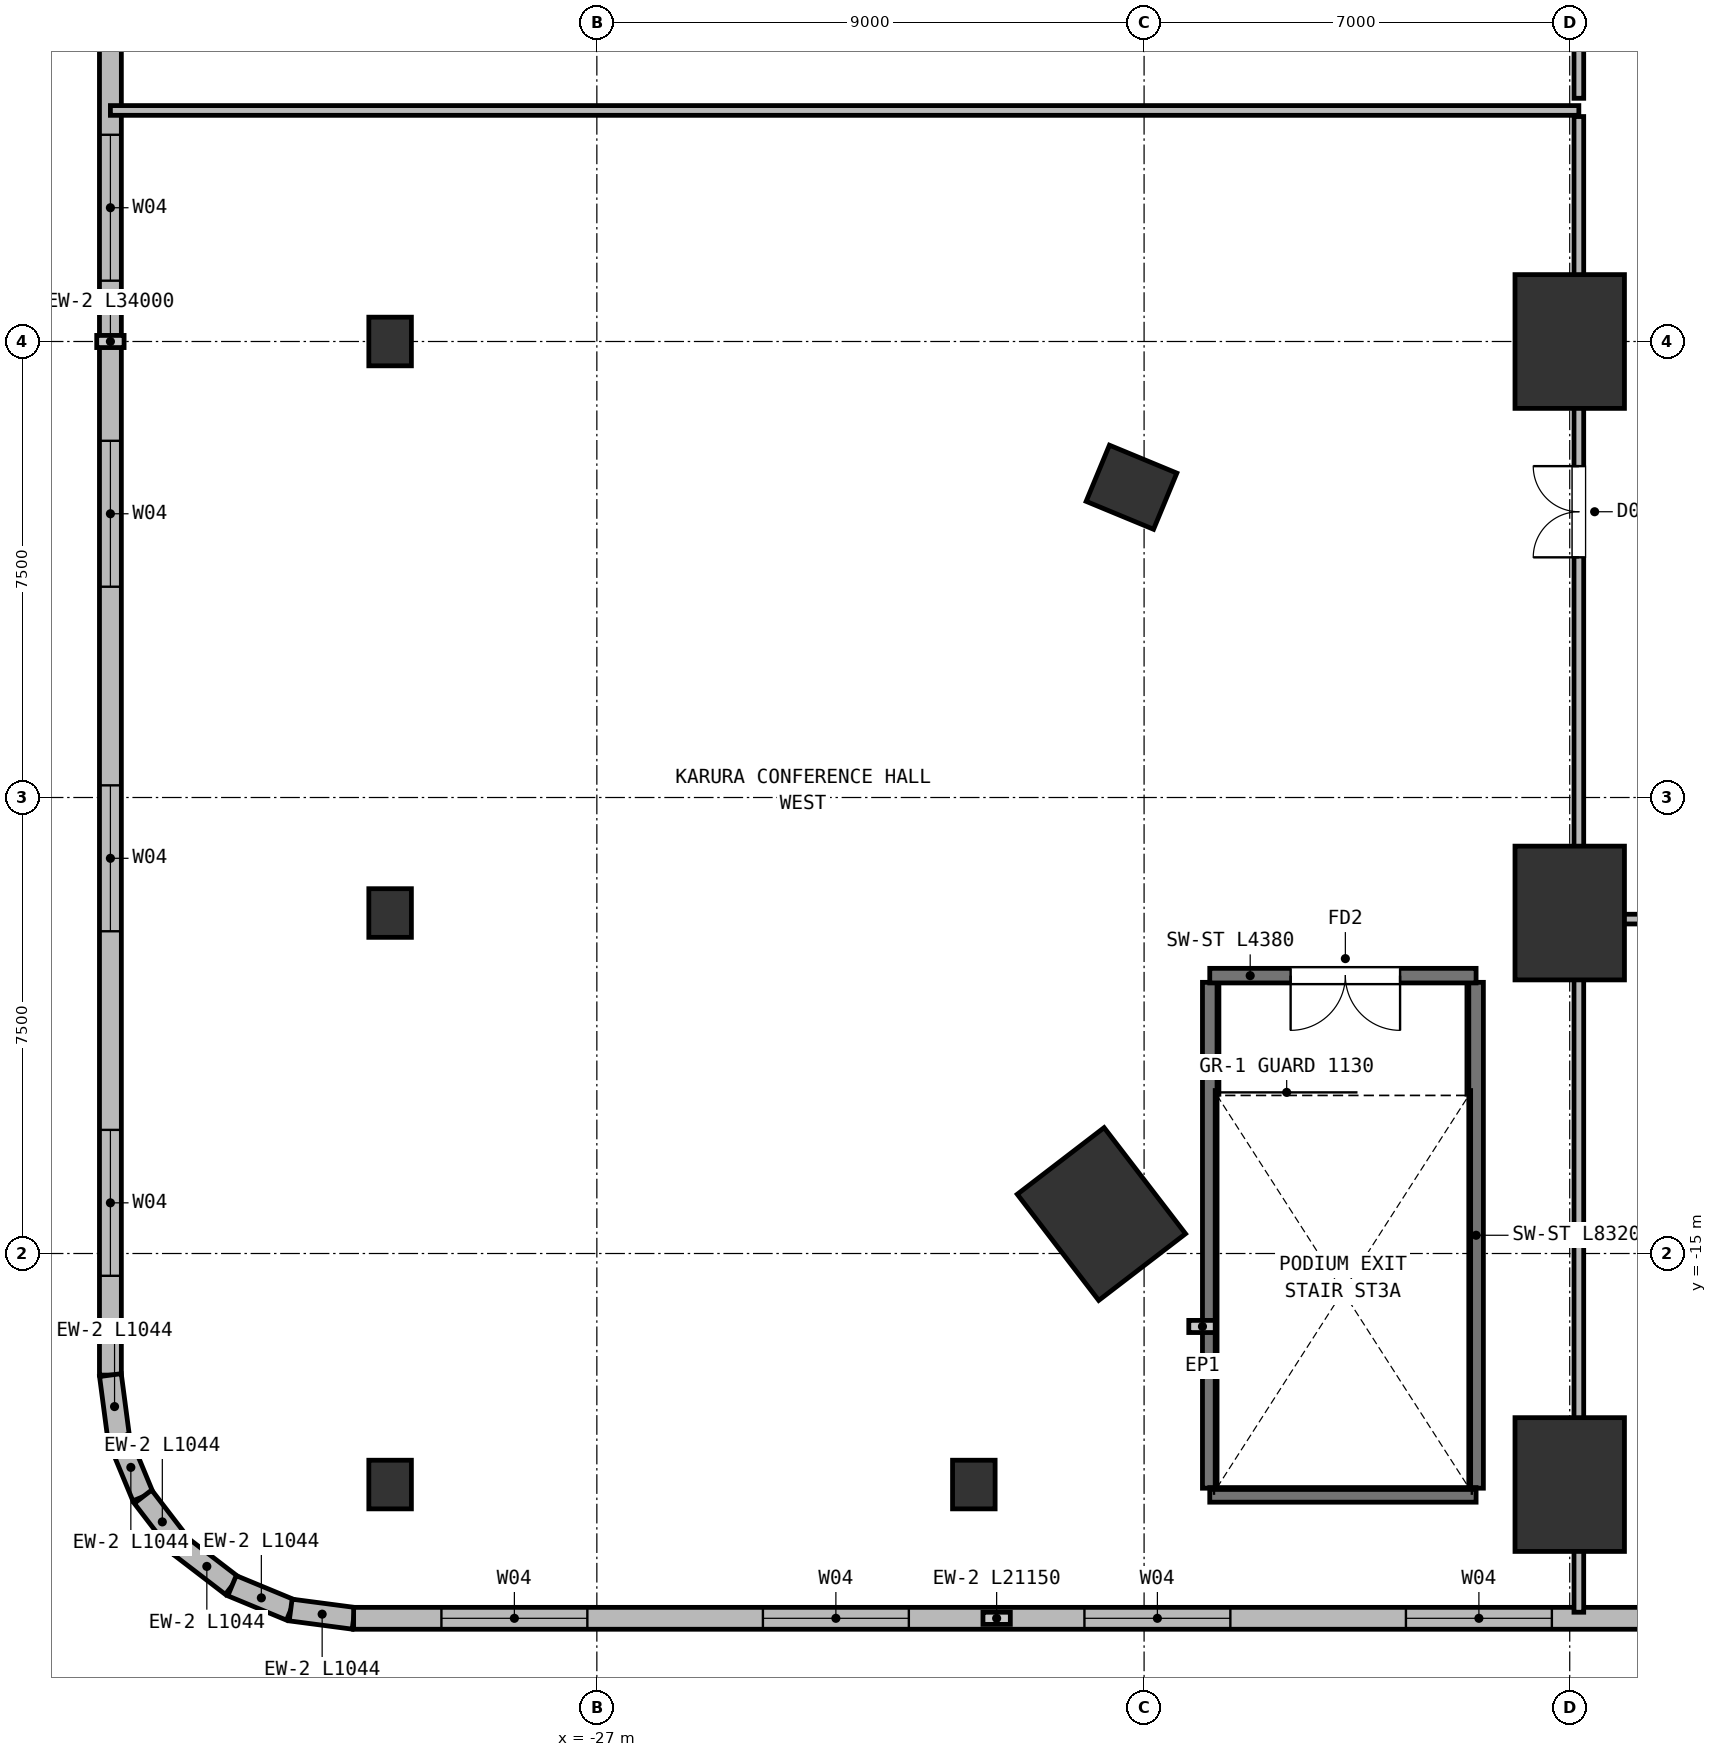
"""IFC4 building model, lengths in metres.
Left out: names, types, materials, properties, quantities, classifications, styles, units other than length and angle.
Written with IfcOpenShell. Run it as: python <this file> out.ifc"""

import sys

from ifc_helpers import new_model, si_unit, direction, frame, frame_2d, origin, origin_2d, place, context, subcontext, project, spatial, rectangle, extrude, element, fill, save


model = new_model("IFC4")
c1 = context("Model", 3, precision=1e-05, world=origin(), true_north=direction((0.0, 1.0)))
c2 = subcontext(c1, "Body", "Model", "MODEL_VIEW")
j1 = project(units=[si_unit("LENGTHUNIT", "METRE"), si_unit("PLANEANGLEUNIT", "RADIAN")], contexts=[c1])
p1 = place(None, origin())
s1 = spatial("IfcSite", under=j1, at=p1, CompositionType="ELEMENT")
p2 = place(p1, origin())
s2 = spatial("IfcBuilding", under=s1, at=p2, CompositionType="ELEMENT")
p3 = place(p2, frame((0.0, 0.0, 26.0)))
s3 = spatial("IfcBuildingStorey", under=s2, at=p3, CompositionType="ELEMENT", Elevation=26.0)
p4 = place(p3, frame((-18.207, -2.397, 0.0), z_axis=(0.0, 0.0, 1.0), x_axis=(0.382683432365, 0.923879532511, 0.0)))
e1 = element("IfcColumn", 1, at=p4, inside=s3, PredefinedType="COLUMN", context=c2, shape_type="SweptSolid", body=[
    extrude(rectangle(XDim=1.0, YDim=1.2, at=origin_2d()), origin(), (0.0, 0.0, 1.0), 4.5),
])
p5 = place(p3, frame((-18.702, -14.351, 0.0), z_axis=(0.0, 0.0, 1.0), x_axis=(0.793353340291, 0.608761429009, 0.0)))
e2 = element("IfcColumn", 2, at=p5, inside=s3, PredefinedType="COLUMN", context=c2, shape_type="SweptSolid", body=[
    extrude(rectangle(XDim=1.8, YDim=2.2, at=origin_2d()), origin(), (0.0, 0.0, 1.0), 4.5),
])
for number, where, z_axis, x_axis in (
    (3, (-30.4, -18.8, 0.0), (0.0, 0.0, 1.0), (1.0, 0.0, 0.0)),
    (4, (-30.4, -9.4, 0.0), (0.0, 0.0, 1.0), (1.0, 0.0, 0.0)),
    (5, (-30.4, 0.0, 0.0), (0.0, 0.0, 1.0), (1.0, 0.0, 0.0)),
    (6, (-20.8, -18.8, 0.0), (0.0, 0.0, 1.0), (1.0, 0.0, 0.0)),
):
    element("IfcColumn", number, at=place(p3, frame(where, z_axis=z_axis, x_axis=x_axis)), inside=s3, PredefinedType="COLUMN", context=c2, shape_type="SweptSolid", body=[
        extrude(rectangle(XDim=0.7, YDim=0.8, at=origin_2d()), origin(), (0.0, 0.0, 1.0), 4.5),
    ])
for number, where, z_axis, x_axis in (
    (7, (-11.0, -18.8, 0.0), (0.0, 0.0, 1.0), (1.0, 0.0, 0.0)),
    (8, (-11.0, -9.4, 0.0), (0.0, 0.0, 1.0), (1.0, 0.0, 0.0)),
    (9, (-11.0, 0.0, 0.0), (0.0, 0.0, 1.0), (1.0, 0.0, 0.0)),
):
    element("IfcColumn", number, at=place(p3, frame(where, z_axis=z_axis, x_axis=x_axis)), inside=s3, PredefinedType="COLUMN", context=c2, shape_type="SweptSolid", body=[
        extrude(rectangle(XDim=1.8, YDim=2.2, at=origin_2d()), origin(), (0.0, 0.0, 1.0), 4.5),
    ])
p6 = place(p3, frame((-35.0, -17.0, 0.0), z_axis=(0.0, 0.0, 1.0), x_axis=(0.0, 1.0, 0.0)))
e10 = element("IfcWall", 10, at=p6, inside=s3, PredefinedType="SOLIDWALL", context=c2, shape_type="SweptSolid", body=[
    extrude(rectangle(XDim=34.0, YDim=0.36, at=frame_2d((17.0, 0.0))), origin(), (0.0, 0.0, 1.0), 4.25),
])
p7 = place(p6, frame((1.633, 0.0, 0.95)))
e11 = element("IfcOpeningElement", 11, at=p7, cuts=e10, PredefinedType="OPENING", context=c2, shape_type="SweptSolid", body=[
    extrude(rectangle(XDim=2.4, YDim=2.6, at=frame_2d((1.2, 1.3))), frame((0.0, 0.19, 0.0), z_axis=(0.0, -1.0, 0.0), x_axis=(1.0, 0.0, 0.0)), (0.0, 0.0, 1.0), 0.38),
])
p8 = place(p6, frame((7.3, 0.0, 0.95)))
e12 = element("IfcOpeningElement", 12, at=p8, cuts=e10, PredefinedType="OPENING", context=c2, shape_type="SweptSolid", body=[
    extrude(rectangle(XDim=2.4, YDim=2.6, at=frame_2d((1.2, 1.3))), frame((0.0, 0.19, 0.0), z_axis=(0.0, -1.0, 0.0), x_axis=(1.0, 0.0, 0.0)), (0.0, 0.0, 1.0), 0.38),
])
p9 = place(p6, frame((12.967, 0.0, 0.95)))
e13 = element("IfcOpeningElement", 13, at=p9, cuts=e10, PredefinedType="OPENING", context=c2, shape_type="SweptSolid", body=[
    extrude(rectangle(XDim=2.4, YDim=2.6, at=frame_2d((1.2, 1.3))), frame((0.0, 0.19, 0.0), z_axis=(0.0, -1.0, 0.0), x_axis=(1.0, 0.0, 0.0)), (0.0, 0.0, 1.0), 0.38),
])
p10 = place(p6, frame((18.0, 0.0, 0.95)))
e14 = element("IfcOpeningElement", 14, at=p10, cuts=e10, PredefinedType="OPENING", context=c2, shape_type="SweptSolid", body=[
    extrude(rectangle(XDim=2.4, YDim=2.6, at=frame_2d((1.2, 1.3))), frame((0.0, 0.19, 0.0), z_axis=(0.0, -1.0, 0.0), x_axis=(1.0, 0.0, 0.0)), (0.0, 0.0, 1.0), 0.38),
])
p11 = place(p6, frame((24.3, 0.0, 0.95)))
e15 = element("IfcOpeningElement", 15, at=p11, cuts=e10, PredefinedType="OPENING", context=c2, shape_type="SweptSolid", body=[
    extrude(rectangle(XDim=2.4, YDim=2.6, at=frame_2d((1.2, 1.3))), frame((0.0, 0.19, 0.0), z_axis=(0.0, -1.0, 0.0), x_axis=(1.0, 0.0, 0.0)), (0.0, 0.0, 1.0), 0.38),
])
p12 = place(p6, frame((29.967, 0.0, 0.95)))
e16 = element("IfcOpeningElement", 16, at=p12, cuts=e10, PredefinedType="OPENING", context=c2, shape_type="SweptSolid", body=[
    extrude(rectangle(XDim=2.4, YDim=2.6, at=frame_2d((1.2, 1.3))), frame((0.0, 0.19, 0.0), z_axis=(0.0, -1.0, 0.0), x_axis=(1.0, 0.0, 0.0)), (0.0, 0.0, 1.0), 0.38),
])
p13 = place(p3, frame((-34.864, -18.035, 0.0), z_axis=(0.0, 0.0, 1.0), x_axis=(-0.130448465198, 0.991455091231, 0.0)))
e17 = element("IfcWall", 17, at=p13, inside=s3, PredefinedType="SOLIDWALL", context=c2, shape_type="SweptSolid", body=[
    extrude(rectangle(XDim=1.044, YDim=0.36, at=frame_2d((0.522, 0.0))), origin(), (0.0, 0.0, 1.0), 4.25),
])
for number, where, z_axis, x_axis in (
    (18, (-34.464, -19.0, 0.0), (0.0, 0.0, 1.0), (-0.383, 0.924, 0.0)),
    (19, (-33.828, -19.828, 0.0), (0.0, 0.0, 1.0), (-0.609, 0.793, 0.0)),
    (20, (-33.0, -20.464, 0.0), (0.0, 0.0, 1.0), (-0.793, 0.609, 0.0)),
    (21, (-32.035, -20.864, 0.0), (0.0, 0.0, 1.0), (-0.924, 0.383, 0.0)),
):
    element("IfcWall", number, at=place(p3, frame(where, z_axis=z_axis, x_axis=x_axis)), inside=s3, PredefinedType="SOLIDWALL", context=c2, shape_type="SweptSolid", body=[
        extrude(rectangle(XDim=1.044, YDim=0.36, at=frame_2d((0.522, 0.0))), origin(), (0.0, 0.0, 1.0), 4.25),
    ])
p14 = place(p3, frame((-31.0, -21.0, 0.0), z_axis=(0.0, 0.0, 1.0), x_axis=(-0.991455091231, 0.130448465198, 0.0)))
e22 = element("IfcWall", 22, at=p14, inside=s3, PredefinedType="SOLIDWALL", context=c2, shape_type="SweptSolid", body=[
    extrude(rectangle(XDim=1.044, YDim=0.36, at=frame_2d((0.522, 0.0))), origin(), (0.0, 0.0, 1.0), 4.25),
])
p15 = place(p3, frame((-9.85, -21.0, 0.0), z_axis=(0.0, 0.0, 1.0), x_axis=(-1.0, 0.0, 0.0)))
e23 = element("IfcWall", 23, at=p15, inside=s3, PredefinedType="SOLIDWALL", context=c2, shape_type="SweptSolid", body=[
    extrude(rectangle(XDim=21.15, YDim=0.36, at=frame_2d((10.575, 0.0))), origin(), (0.0, 0.0, 1.0), 4.25),
])
p16 = place(p15, frame((1.444, 0.0, 0.95)))
e24 = element("IfcOpeningElement", 24, at=p16, cuts=e23, PredefinedType="OPENING", context=c2, shape_type="SweptSolid", body=[
    extrude(rectangle(XDim=2.4, YDim=2.6, at=frame_2d((1.2, 1.3))), frame((0.0, 0.19, 0.0), z_axis=(0.0, -1.0, 0.0), x_axis=(1.0, 0.0, 0.0)), (0.0, 0.0, 1.0), 0.38),
])
p17 = place(p15, frame((6.731, 0.0, 0.95)))
e25 = element("IfcOpeningElement", 25, at=p17, cuts=e23, PredefinedType="OPENING", context=c2, shape_type="SweptSolid", body=[
    extrude(rectangle(XDim=2.4, YDim=2.6, at=frame_2d((1.2, 1.3))), frame((0.0, 0.19, 0.0), z_axis=(0.0, -1.0, 0.0), x_axis=(1.0, 0.0, 0.0)), (0.0, 0.0, 1.0), 0.38),
])
p18 = place(p15, frame((12.019, 0.0, 0.95)))
e26 = element("IfcOpeningElement", 26, at=p18, cuts=e23, PredefinedType="OPENING", context=c2, shape_type="SweptSolid", body=[
    extrude(rectangle(XDim=2.4, YDim=2.6, at=frame_2d((1.2, 1.3))), frame((0.0, 0.19, 0.0), z_axis=(0.0, -1.0, 0.0), x_axis=(1.0, 0.0, 0.0)), (0.0, 0.0, 1.0), 0.38),
])
p19 = place(p15, frame((17.306, 0.0, 0.95)))
e27 = element("IfcOpeningElement", 27, at=p19, cuts=e23, PredefinedType="OPENING", context=c2, shape_type="SweptSolid", body=[
    extrude(rectangle(XDim=2.4, YDim=2.6, at=frame_2d((1.2, 1.3))), frame((0.0, 0.19, 0.0), z_axis=(0.0, -1.0, 0.0), x_axis=(1.0, 0.0, 0.0)), (0.0, 0.0, 1.0), 0.38),
])
for number, where, z_axis, x_axis in (
    (28, (-16.92, -18.86, 0.0), (0.0, 0.0, 1.0), (0.0, 1.0, 0.0)),
    (29, (-12.54, -18.86, 0.0), (0.0, 0.0, 1.0), (0.0, 1.0, 0.0)),
):
    element("IfcWall", number, at=place(p3, frame(where, z_axis=z_axis, x_axis=x_axis)), inside=s3, PredefinedType="SHEAR", context=c2, shape_type="SweptSolid", body=[
        extrude(rectangle(XDim=8.32, YDim=0.24, at=frame_2d((4.16, 0.0))), origin(), (0.0, 0.0, 1.0), 4.25),
    ])
p20 = place(p3, frame((-16.92, -18.97, 0.0), z_axis=(0.0, 0.0, 1.0), x_axis=(1.0, 0.0, 0.0)))
e30 = element("IfcWall", 30, at=p20, inside=s3, PredefinedType="SHEAR", context=c2, shape_type="SweptSolid", body=[
    extrude(rectangle(XDim=4.38, YDim=0.24, at=frame_2d((2.19, 0.0))), origin(), (0.0, 0.0, 1.0), 4.25),
])
p21 = place(p3, frame((-12.54, -10.43, 0.0), z_axis=(0.0, 0.0, 1.0), x_axis=(-1.0, 0.0, 0.0)))
e31 = element("IfcWall", 31, at=p21, inside=s3, PredefinedType="SHEAR", context=c2, shape_type="SweptSolid", body=[
    extrude(rectangle(XDim=4.38, YDim=0.24, at=frame_2d((2.19, 0.0))), origin(), (0.0, 0.0, 1.0), 4.25),
])
p22 = place(p21, frame((1.25, 0.0, 0.0)))
e32 = element("IfcOpeningElement", 32, at=p22, cuts=e31, PredefinedType="OPENING", context=c2, shape_type="SweptSolid", body=[
    extrude(rectangle(XDim=1.8, YDim=2.2, at=frame_2d((0.9, 1.1))), frame((0.0, 0.13, 0.0), z_axis=(0.0, -1.0, 0.0), x_axis=(1.0, 0.0, 0.0)), (0.0, 0.0, 1.0), 0.26),
])
p23 = place(p3, frame((-10.85, 3.8, 0.0), z_axis=(0.0, 0.0, 1.0), x_axis=(-1.0, 0.0, 0.0)))
e33 = element("IfcWall", 33, at=p23, inside=s3, PredefinedType="PARTITIONING", context=c2, shape_type="SweptSolid", body=[
    extrude(rectangle(XDim=24.15, YDim=0.16, at=frame_2d((12.075, 0.0))), origin(), (0.0, 0.0, 1.0), 4.25),
])
p24 = place(p3, frame((-10.85, -20.9, 0.0), z_axis=(0.0, 0.0, 1.0), x_axis=(0.0, 1.0, 0.0)))
e34 = element("IfcWall", 34, at=p24, inside=s3, PredefinedType="PARTITIONING", context=c2, shape_type="SweptSolid", body=[
    extrude(rectangle(XDim=24.6, YDim=0.16, at=frame_2d((12.3, 0.0))), origin(), (0.0, 0.0, 1.0), 3.62),
])
p25 = place(p24, frame((17.35, 0.0, 0.0)))
e35 = element("IfcOpeningElement", 35, at=p25, cuts=e34, PredefinedType="OPENING", context=c2, shape_type="SweptSolid", body=[
    extrude(rectangle(XDim=1.5, YDim=2.2, at=frame_2d((0.75, 1.1))), frame((0.0, 0.09, 0.0), z_axis=(0.0, -1.0, 0.0), x_axis=(1.0, 0.0, 0.0)), (0.0, 0.0, 1.0), 0.18),
])
p26 = place(p3, frame((-10.85, 4.0, 0.0), z_axis=(0.0, 0.0, 1.0), x_axis=(0.0, 1.0, 0.0)))
e36 = element("IfcWall", 36, at=p26, inside=s3, PredefinedType="PARTITIONING", context=c2, shape_type="SweptSolid", body=[
    extrude(rectangle(XDim=16.9, YDim=0.16, at=frame_2d((8.45, 0.0))), origin(), (0.0, 0.0, 1.0), 3.62),
])
p27 = place(p26, frame((2.06, 0.0, 0.0)))
e37 = element("IfcOpeningElement", 37, at=p27, cuts=e36, PredefinedType="OPENING", context=c2, shape_type="SweptSolid", body=[
    extrude(rectangle(XDim=1.5, YDim=2.2, at=frame_2d((0.75, 1.1))), frame((0.0, 0.09, 0.0), z_axis=(0.0, -1.0, 0.0), x_axis=(1.0, 0.0, 0.0)), (0.0, 0.0, 1.0), 0.18),
])
p28 = place(p3, frame((10.75, -9.5, 0.0), z_axis=(0.0, 0.0, 1.0), x_axis=(-1.0, 0.0, 0.0)))
e38 = element("IfcWall", 38, at=p28, inside=s3, PredefinedType="PARTITIONING", context=c2, shape_type="SweptSolid", body=[
    extrude(rectangle(XDim=21.5, YDim=0.16, at=frame_2d((10.75, 0.0))), origin(), (0.0, 0.0, 1.0), 3.33),
])
p29 = place(p28, frame((13.8, 0.0, 0.0)))
e39 = element("IfcOpeningElement", 39, at=p29, cuts=e38, PredefinedType="OPENING", context=c2, shape_type="SweptSolid", body=[
    extrude(rectangle(XDim=1.5, YDim=2.2, at=frame_2d((0.75, 1.1))), frame((0.0, 0.09, 0.0), z_axis=(0.0, -1.0, 0.0), x_axis=(1.0, 0.0, 0.0)), (0.0, 0.0, 1.0), 0.18),
])
p30 = place(p7, origin())
e40 = element("IfcWindow", 40, at=p30, inside=s3, PartitioningType="SINGLE_PANEL", PredefinedType="WINDOW", context=c2, shape_type="SweptSolid", body=[
    extrude(rectangle(XDim=2.4, YDim=2.6, at=frame_2d((1.2, 1.3))), frame((0.0, 0.03, 0.0), z_axis=(0.0, -1.0, 0.0), x_axis=(1.0, 0.0, 0.0)), (0.0, 0.0, 1.0), 0.06),
])
fill(e11, e40)
p31 = place(p8, origin())
e41 = element("IfcWindow", 41, at=p31, inside=s3, PartitioningType="SINGLE_PANEL", PredefinedType="WINDOW", context=c2, shape_type="SweptSolid", body=[
    extrude(rectangle(XDim=2.4, YDim=2.6, at=frame_2d((1.2, 1.3))), frame((0.0, 0.03, 0.0), z_axis=(0.0, -1.0, 0.0), x_axis=(1.0, 0.0, 0.0)), (0.0, 0.0, 1.0), 0.06),
])
fill(e12, e41)
p32 = place(p9, origin())
e42 = element("IfcWindow", 42, at=p32, inside=s3, PartitioningType="SINGLE_PANEL", PredefinedType="WINDOW", context=c2, shape_type="SweptSolid", body=[
    extrude(rectangle(XDim=2.4, YDim=2.6, at=frame_2d((1.2, 1.3))), frame((0.0, 0.03, 0.0), z_axis=(0.0, -1.0, 0.0), x_axis=(1.0, 0.0, 0.0)), (0.0, 0.0, 1.0), 0.06),
])
fill(e13, e42)
p33 = place(p10, origin())
e43 = element("IfcWindow", 43, at=p33, inside=s3, PartitioningType="SINGLE_PANEL", PredefinedType="WINDOW", context=c2, shape_type="SweptSolid", body=[
    extrude(rectangle(XDim=2.4, YDim=2.6, at=frame_2d((1.2, 1.3))), frame((0.0, 0.03, 0.0), z_axis=(0.0, -1.0, 0.0), x_axis=(1.0, 0.0, 0.0)), (0.0, 0.0, 1.0), 0.06),
])
fill(e14, e43)
p34 = place(p16, origin())
e44 = element("IfcWindow", 44, at=p34, inside=s3, PartitioningType="SINGLE_PANEL", PredefinedType="WINDOW", context=c2, shape_type="SweptSolid", body=[
    extrude(rectangle(XDim=2.4, YDim=2.6, at=frame_2d((1.2, 1.3))), frame((0.0, 0.03, 0.0), z_axis=(0.0, -1.0, 0.0), x_axis=(1.0, 0.0, 0.0)), (0.0, 0.0, 1.0), 0.06),
])
fill(e24, e44)
p35 = place(p17, origin())
e45 = element("IfcWindow", 45, at=p35, inside=s3, PartitioningType="SINGLE_PANEL", PredefinedType="WINDOW", context=c2, shape_type="SweptSolid", body=[
    extrude(rectangle(XDim=2.4, YDim=2.6, at=frame_2d((1.2, 1.3))), frame((0.0, 0.03, 0.0), z_axis=(0.0, -1.0, 0.0), x_axis=(1.0, 0.0, 0.0)), (0.0, 0.0, 1.0), 0.06),
])
fill(e25, e45)
p36 = place(p18, origin())
e46 = element("IfcWindow", 46, at=p36, inside=s3, PartitioningType="SINGLE_PANEL", PredefinedType="WINDOW", context=c2, shape_type="SweptSolid", body=[
    extrude(rectangle(XDim=2.4, YDim=2.6, at=frame_2d((1.2, 1.3))), frame((0.0, 0.03, 0.0), z_axis=(0.0, -1.0, 0.0), x_axis=(1.0, 0.0, 0.0)), (0.0, 0.0, 1.0), 0.06),
])
fill(e26, e46)
p37 = place(p19, origin())
e47 = element("IfcWindow", 47, at=p37, inside=s3, PartitioningType="SINGLE_PANEL", PredefinedType="WINDOW", context=c2, shape_type="SweptSolid", body=[
    extrude(rectangle(XDim=2.4, YDim=2.6, at=frame_2d((1.2, 1.3))), frame((0.0, 0.03, 0.0), z_axis=(0.0, -1.0, 0.0), x_axis=(1.0, 0.0, 0.0)), (0.0, 0.0, 1.0), 0.06),
])
fill(e27, e47)
p38 = place(p22, origin())
e48 = element("IfcDoor", 48, at=p38, inside=s3, OperationType="DOUBLE_DOOR_SINGLE_SWING", PredefinedType="DOOR", context=c2, shape_type="SweptSolid", body=[
    extrude(rectangle(XDim=1.8, YDim=2.2, at=frame_2d((0.9, 1.1))), frame((0.0, 0.025, 0.0), z_axis=(0.0, -1.0, 0.0), x_axis=(1.0, 0.0, 0.0)), (0.0, 0.0, 1.0), 0.05),
])
fill(e32, e48)
p39 = place(p25, origin())
e49 = element("IfcDoor", 49, at=p39, inside=s3, OperationType="DOUBLE_DOOR_SINGLE_SWING", PredefinedType="DOOR", context=c2, shape_type="SweptSolid", body=[
    extrude(rectangle(XDim=1.5, YDim=2.2, at=frame_2d((0.75, 1.1))), frame((0.0, 0.025, 0.0), z_axis=(0.0, -1.0, 0.0), x_axis=(1.0, 0.0, 0.0)), (0.0, 0.0, 1.0), 0.05),
])
fill(e35, e49)
save(model, sys.argv[1])
